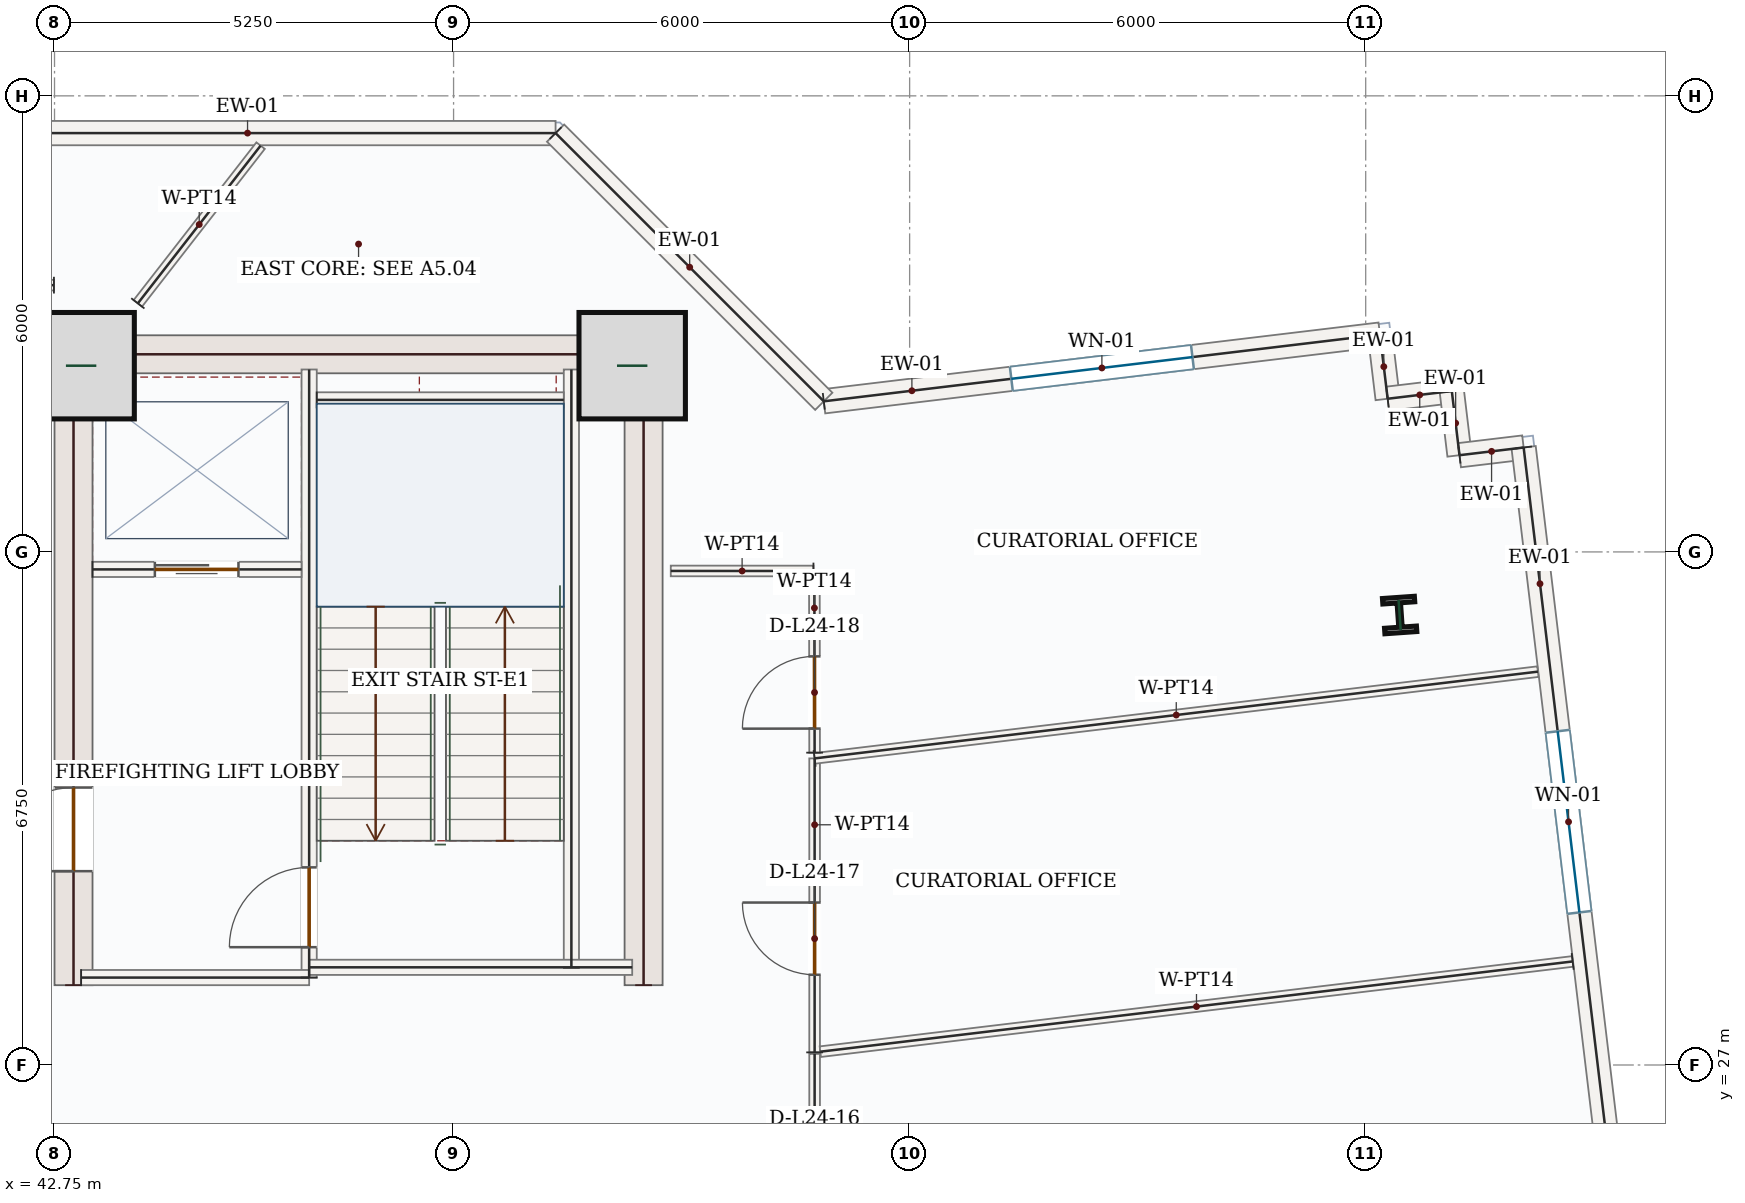
"""IFC4 building model, lengths in metres.
Left out: names, types, materials, properties, quantities, classifications, styles, units other than length and angle.
Written with IfcOpenShell. Run it as: python <this file> out.ifc"""

import sys

from ifc_helpers import new_model, si_unit, direction, frame, frame_2d, origin, origin_2d, place, context, subcontext, project, spatial, rectangle, i_section, extrude, source, transform, mapped, element, fill, save


model = new_model("IFC4")
c1 = context("Model", 3, precision=1e-05, world=origin(), true_north=direction((0.0, 1.0)))
c2 = subcontext(c1, "Body", "Model", "MODEL_VIEW")
j1 = project(units=[si_unit("LENGTHUNIT", "METRE"), si_unit("PLANEANGLEUNIT", "RADIAN")], contexts=[c1])
p1 = place(None, origin())
s1 = spatial("IfcSite", under=j1, at=p1, CompositionType="ELEMENT")
p2 = place(p1, origin())
s2 = spatial("IfcBuilding", under=s1, at=p2, CompositionType="ELEMENT")
p3 = place(p2, frame((0.0, 0.0, 108.9)))
s3 = spatial("IfcBuildingStorey", under=s2, at=p3, CompositionType="ELEMENT", Elevation=108.9)
p4 = place(p3, frame((43.0, 28.05, 0.0), z_axis=(0.0, 0.0, 1.0), x_axis=(0.0, 1.0, 0.0)))
e1 = element("IfcWall", 1, at=p4, inside=s3, PredefinedType="SHEAR", context=c2, shape_type="SweptSolid", body=[
    extrude(rectangle(XDim=8.55, YDim=0.5, at=frame_2d((4.275, 0.0))), origin(), (0.0, 0.0, 1.0), 3.95),
])
p5 = place(p4, frame((1.5, 0.0, 0.0)))
e2 = element("IfcOpeningElement", 2, at=p5, cuts=e1, PredefinedType="OPENING", context=c2, shape_type="SweptSolid", body=[
    extrude(rectangle(XDim=1.1, YDim=2.2, at=frame_2d((0.55, 1.1))), frame((0.0, 0.26, 0.0), z_axis=(0.0, -1.0, 0.0), x_axis=(1.0, 0.0, 0.0)), (0.0, 0.0, 1.0), 0.52),
])
m1 = source(origin(), c2, "Body", "SweptSolid", [
    extrude(rectangle(XDim=8.55, YDim=0.5, at=frame_2d((4.275, 0.0))), origin(), (0.0, 0.0, 1.0), 3.95),
])
p6 = place(p3, frame((50.5, 28.05, 0.0), z_axis=(0.0, 0.0, 1.0), x_axis=(0.0, 1.0, 0.0)))
e3 = element("IfcWall", 3, at=p6, inside=s3, PredefinedType="SHEAR", context=c2, shape_type="MappedRepresentation", body=[
    mapped(m1, transform((0.0, 0.0, 0.0), x_axis=(1.0, 0.0, 0.0), y_axis=(0.0, 1.0, 0.0), z_axis=(0.0, 0.0, 1.0), scale=1.0)),
])
m2 = source(origin(), c2, "Body", "SweptSolid", [
    extrude(rectangle(XDim=7.0, YDim=0.5, at=frame_2d((3.5, 0.0))), origin(), (0.0, 0.0, 1.0), 3.95),
])
p7 = place(p3, frame((43.25, 36.35, 0.0), z_axis=(0.0, 0.0, 1.0), x_axis=(1.0, 0.0, 0.0)))
e4 = element("IfcWall", 4, at=p7, inside=s3, PredefinedType="SHEAR", context=c2, shape_type="MappedRepresentation", body=[
    mapped(m2, transform((0.0, 0.0, 0.0), x_axis=(1.0, 0.0, 0.0), y_axis=(0.0, 1.0, 0.0), z_axis=(0.0, 0.0, 1.0), scale=1.0)),
])
m3 = source(origin(), c2, "Body", "SweptSolid", [
    extrude(rectangle(XDim=1.4, YDim=1.4, at=origin_2d()), origin(), (0.0, 0.0, 1.0), 4.2),
])
for number, where, z_axis, x_axis in (
    (5, (43.1, 36.2, 0.0), (0.0, 0.0, 1.0), (1.0, 0.0, 0.0)),
    (6, (50.35, 36.2, 0.0), (0.0, 0.0, 1.0), (1.0, 0.0, 0.0)),
):
    element("IfcColumn", number, at=place(p3, frame(where, z_axis=z_axis, x_axis=x_axis)), inside=s3, PredefinedType="COLUMN", context=c2, shape_type="MappedRepresentation", body=[
        mapped(m3, transform((0.0, 0.0, 0.0), x_axis=(1.0, 0.0, 0.0), y_axis=(0.0, 1.0, 0.0), z_axis=(0.0, 0.0, 1.0), scale=1.0)),
    ])
m4 = source(origin(), c2, "Body", "SweptSolid", [
    extrude(i_section(OverallWidth=0.421, OverallDepth=0.465, WebThickness=0.045, FlangeThickness=0.073, FilletRadius=0.018, at=origin_2d()), origin(), (0.0, 0.0, 1.0), 4.2),
])
p8 = place(p3, frame((60.447, 32.92, 0.0), z_axis=(0.0, 0.0, 1.0), x_axis=(0.99756405026, 0.069756473744, 0.0)))
e7 = element("IfcColumn", 7, at=p8, inside=s3, PredefinedType="COLUMN", context=c2, shape_type="MappedRepresentation", body=[
    mapped(m4, transform((0.0, 0.0, 0.0), x_axis=(1.0, 0.0, 0.0), y_axis=(0.0, 1.0, 0.0), z_axis=(0.0, 0.0, 1.0), scale=1.0)),
])
p9 = place(p3, frame((52.871, 35.731, 0.0), z_axis=(0.0, 0.0, 1.0), x_axis=(0.992882794037, 0.119095580547, 0.0)))
e8 = element("IfcWall", 8, at=p9, inside=s3, PredefinedType="SOLIDWALL", context=c2, shape_type="SweptSolid", body=[
    extrude(rectangle(XDim=7.37, YDim=0.32, at=frame_2d((3.685, 0.0))), origin(), (0.0, 0.0, 1.0), 3.95),
])
p10 = place(p9, frame((2.485, 0.0, 0.85)))
e9 = element("IfcOpeningElement", 9, at=p10, cuts=e8, PredefinedType="OPENING", context=c2, shape_type="SweptSolid", body=[
    extrude(rectangle(XDim=2.4, YDim=1.8, at=frame_2d((1.2, 0.9))), frame((0.0, 0.17, 0.0), z_axis=(0.0, -1.0, 0.0), x_axis=(1.0, 0.0, 0.0)), (0.0, 0.0, 1.0), 0.34),
])
m5 = source(origin(), c2, "Body", "SweptSolid", [
    extrude(rectangle(XDim=0.85, YDim=0.32, at=frame_2d((0.425, 0.0))), origin(), (0.0, 0.0, 1.0), 3.95),
])
for number, where, z_axis, x_axis in (
    (10, (60.188, 36.609, 0.0), (0.0, 0.0, 1.0), (0.119, -0.993, 0.0)),
    (11, (60.289, 35.765, 0.0), (0.0, 0.0, 1.0), (0.993, 0.119, 0.0)),
):
    element("IfcWall", number, at=place(p3, frame(where, z_axis=z_axis, x_axis=x_axis)), inside=s3, PredefinedType="SOLIDWALL", context=c2, shape_type="MappedRepresentation", body=[
        mapped(m5, transform((0.0, 0.0, 0.0), x_axis=(1.0, 0.0, 0.0), y_axis=(0.0, 1.0, 0.0), z_axis=(0.0, 0.0, 1.0), scale=1.0)),
    ])
m6 = source(origin(), c2, "Body", "SweptSolid", [
    extrude(rectangle(XDim=0.85, YDim=0.32, at=frame_2d((0.425, 0.0))), origin(), (0.0, 0.0, 1.0), 3.95),
])
p11 = place(p3, frame((61.133, 35.866, 0.0), z_axis=(0.0, 0.0, 1.0), x_axis=(0.11894130009, -0.992901287708, 0.0)))
e12 = element("IfcWall", 12, at=p11, inside=s3, PredefinedType="SOLIDWALL", context=c2, shape_type="MappedRepresentation", body=[
    mapped(m6, transform((0.0, 0.0, 0.0), x_axis=(1.0, 0.0, 0.0), y_axis=(0.0, 1.0, 0.0), z_axis=(0.0, 0.0, 1.0), scale=1.0)),
])
p12 = place(p3, frame((61.234, 35.022, 0.0), z_axis=(0.0, 0.0, 1.0), x_axis=(0.992905350382, 0.118907380694, 0.0)))
e13 = element("IfcWall", 13, at=p12, inside=s3, PredefinedType="SOLIDWALL", context=c2, shape_type="MappedRepresentation", body=[
    mapped(m5, transform((0.0, 0.0, 0.0), x_axis=(1.0, 0.0, 0.0), y_axis=(0.0, 1.0, 0.0), z_axis=(0.0, 0.0, 1.0), scale=1.0)),
])
p13 = place(p3, frame((62.078, 35.124, 0.0), z_axis=(0.0, 0.0, 1.0), x_axis=(0.119092815244, -0.992883125729, 0.0)))
e14 = element("IfcWall", 14, at=p13, inside=s3, PredefinedType="SOLIDWALL", context=c2, shape_type="SweptSolid", body=[
    extrude(rectangle(XDim=9.92, YDim=0.32, at=frame_2d((4.96, 0.0))), origin(), (0.0, 0.0, 1.0), 3.95),
])
p14 = place(p13, frame((3.76, 0.0, 0.85)))
e15 = element("IfcOpeningElement", 15, at=p14, cuts=e14, PredefinedType="OPENING", context=c2, shape_type="SweptSolid", body=[
    extrude(rectangle(XDim=2.4, YDim=1.8, at=frame_2d((1.2, 0.9))), frame((0.0, 0.17, 0.0), z_axis=(0.0, -1.0, 0.0), x_axis=(1.0, 0.0, 0.0)), (0.0, 0.0, 1.0), 0.34),
])
m7 = source(origin(), c2, "Body", "SweptSolid", [
    extrude(rectangle(XDim=8.105, YDim=0.32, at=frame_2d((4.052, 0.0))), origin(), (0.0, 0.0, 1.0), 3.95),
])
p15 = place(p3, frame((41.237, 39.26, 0.0), z_axis=(0.0, 0.0, 1.0), x_axis=(1.0, 0.0, 0.0)))
e16 = element("IfcWall", 16, at=p15, inside=s3, PredefinedType="SOLIDWALL", context=c2, shape_type="MappedRepresentation", body=[
    mapped(m7, transform((0.0, 0.0, 0.0), x_axis=(1.0, 0.0, 0.0), y_axis=(0.0, 1.0, 0.0), z_axis=(0.0, 0.0, 1.0), scale=1.0)),
])
m8 = source(origin(), c2, "Body", "SweptSolid", [
    extrude(rectangle(XDim=4.99, YDim=0.32, at=frame_2d((2.495, 0.0))), origin(), (0.0, 0.0, 1.0), 3.95),
])
p16 = place(p3, frame((49.342, 39.26, 0.0), z_axis=(0.0, 0.0, 1.0), x_axis=(0.707106781187, -0.707106781187, 0.0)))
e17 = element("IfcWall", 17, at=p16, inside=s3, PredefinedType="SOLIDWALL", context=c2, shape_type="MappedRepresentation", body=[
    mapped(m8, transform((0.0, 0.0, 0.0), x_axis=(1.0, 0.0, 0.0), y_axis=(0.0, 1.0, 0.0), z_axis=(0.0, 0.0, 1.0), scale=1.0)),
])
m9 = source(origin(), c2, "Body", "SweptSolid", [
    extrude(rectangle(XDim=7.87, YDim=0.2, at=frame_2d((3.935, 0.0))), origin(), (0.0, 0.0, 1.0), 3.95),
])
p17 = place(p3, frame((49.55, 28.28, 0.0), z_axis=(0.0, 0.0, 1.0), x_axis=(0.0, 1.0, 0.0)))
e18 = element("IfcWall", 18, at=p17, inside=s3, PredefinedType="SOLIDWALL", context=c2, shape_type="MappedRepresentation", body=[
    mapped(m9, transform((0.0, 0.0, 0.0), x_axis=(1.0, 0.0, 0.0), y_axis=(0.0, 1.0, 0.0), z_axis=(0.0, 0.0, 1.0), scale=1.0)),
])
p18 = place(p3, frame((46.1, 28.15, 0.0), z_axis=(0.0, 0.0, 1.0), x_axis=(0.0, 1.0, 0.0)))
e19 = element("IfcWall", 19, at=p18, inside=s3, PredefinedType="SOLIDWALL", context=c2, shape_type="SweptSolid", body=[
    extrude(rectangle(XDim=8.0, YDim=0.2, at=frame_2d((4.0, 0.0))), origin(), (0.0, 0.0, 1.0), 3.95),
])
p19 = place(p18, frame((0.4, 0.0, 0.0)))
e20 = element("IfcOpeningElement", 20, at=p19, cuts=e19, PredefinedType="OPENING", context=c2, shape_type="SweptSolid", body=[
    extrude(rectangle(XDim=1.05, YDim=2.15, at=frame_2d((0.525, 1.075))), frame((0.0, 0.11, 0.0), z_axis=(0.0, -1.0, 0.0), x_axis=(1.0, 0.0, 0.0)), (0.0, 0.0, 1.0), 0.22),
])
m10 = source(origin(), c2, "Body", "SweptSolid", [
    extrude(rectangle(XDim=3.0, YDim=0.2, at=frame_2d((1.5, 0.0))), origin(), (0.0, 0.0, 1.0), 3.95),
])
p20 = place(p3, frame((43.1, 28.15, 0.0), z_axis=(0.0, 0.0, 1.0), x_axis=(1.0, 0.0, 0.0)))
e21 = element("IfcWall", 21, at=p20, inside=s3, PredefinedType="SOLIDWALL", context=c2, shape_type="MappedRepresentation", body=[
    mapped(m10, transform((0.0, 0.0, 0.0), x_axis=(1.0, 0.0, 0.0), y_axis=(0.0, 1.0, 0.0), z_axis=(0.0, 0.0, 1.0), scale=1.0)),
])
m11 = source(origin(), c2, "Body", "SweptSolid", [
    extrude(rectangle(XDim=4.25, YDim=0.2, at=frame_2d((2.125, 0.0))), origin(), (0.0, 0.0, 1.0), 3.95),
])
p21 = place(p3, frame((46.1, 28.285, 0.0), z_axis=(0.0, 0.0, 1.0), x_axis=(1.0, 0.0, 0.0)))
e22 = element("IfcWall", 22, at=p21, inside=s3, PredefinedType="SOLIDWALL", context=c2, shape_type="MappedRepresentation", body=[
    mapped(m11, transform((0.0, 0.0, 0.0), x_axis=(1.0, 0.0, 0.0), y_axis=(0.0, 1.0, 0.0), z_axis=(0.0, 0.0, 1.0), scale=1.0)),
])
m12 = source(origin(), c2, "Body", "SweptSolid", [
    extrude(rectangle(XDim=3.25, YDim=0.2, at=frame_2d((1.625, 0.0))), origin(), (0.0, 0.0, 1.0), 3.95),
])
p22 = place(p3, frame((46.2, 35.75, 0.0), z_axis=(0.0, 0.0, 1.0), x_axis=(1.0, 0.0, 0.0)))
e23 = element("IfcWall", 23, at=p22, inside=s3, PredefinedType="SOLIDWALL", context=c2, shape_type="MappedRepresentation", body=[
    mapped(m12, transform((0.0, 0.0, 0.0), x_axis=(1.0, 0.0, 0.0), y_axis=(0.0, 1.0, 0.0), z_axis=(0.0, 0.0, 1.0), scale=1.0)),
])
p23 = place(p3, frame((43.25, 33.52, 0.0), z_axis=(0.0, 0.0, 1.0), x_axis=(1.0, 0.0, 0.0)))
e24 = element("IfcWall", 24, at=p23, inside=s3, PredefinedType="SOLIDWALL", context=c2, shape_type="SweptSolid", body=[
    extrude(rectangle(XDim=2.75, YDim=0.2, at=frame_2d((1.375, 0.0))), origin(), (0.0, 0.0, 1.0), 3.95),
])
p24 = place(p23, frame((0.82, 0.0, 0.0)))
e25 = element("IfcOpeningElement", 25, at=p24, cuts=e24, PredefinedType="OPENING", context=c2, shape_type="SweptSolid", body=[
    extrude(rectangle(XDim=1.1, YDim=2.15, at=frame_2d((0.55, 1.075))), frame((0.0, 0.11, 0.0), z_axis=(0.0, -1.0, 0.0), x_axis=(1.0, 0.0, 0.0)), (0.0, 0.0, 1.0), 0.22),
])
p25 = place(p3, frame((52.75, 27.166, 0.0), z_axis=(0.0, 0.0, 1.0), x_axis=(0.0, 1.0, 0.0)))
e26 = element("IfcWall", 26, at=p25, inside=s3, PredefinedType="PARTITIONING", context=c2, shape_type="SweptSolid", body=[
    extrude(rectangle(XDim=3.868, YDim=0.14, at=frame_2d((1.934, 0.0))), origin(), (0.0, 0.0, 1.0), 3.95),
])
p26 = place(p25, frame((1.021, 0.0, 0.0)))
e27 = element("IfcOpeningElement", 27, at=p26, cuts=e26, PredefinedType="OPENING", context=c2, shape_type="SweptSolid", body=[
    extrude(rectangle(XDim=0.95, YDim=2.15, at=frame_2d((0.475, 1.075))), frame((0.0, 0.08, 0.0), z_axis=(0.0, -1.0, 0.0), x_axis=(1.0, 0.0, 0.0)), (0.0, 0.0, 1.0), 0.16),
])
m13 = source(origin(), c2, "Body", "SweptSolid", [
    extrude(rectangle(XDim=9.584, YDim=0.14, at=frame_2d((4.792, 0.0))), origin(), (0.0, 0.0, 1.0), 3.95),
])
p27 = place(p3, frame((52.75, 31.034, 0.0), z_axis=(0.0, 0.0, 1.0), x_axis=(0.992883225705, 0.119091981737, 0.0)))
e28 = element("IfcWall", 28, at=p27, inside=s3, PredefinedType="PARTITIONING", context=c2, shape_type="MappedRepresentation", body=[
    mapped(m13, transform((0.0, 0.0, 0.0), x_axis=(1.0, 0.0, 0.0), y_axis=(0.0, 1.0, 0.0), z_axis=(0.0, 0.0, 1.0), scale=1.0)),
])
m14 = source(origin(), c2, "Body", "SweptSolid", [
    extrude(rectangle(XDim=9.969, YDim=0.14, at=frame_2d((4.984, 0.0))), origin(), (0.0, 0.0, 1.0), 3.95),
])
p28 = place(p3, frame((62.723, 28.362, 0.0), z_axis=(0.0, 0.0, 1.0), x_axis=(-0.992882747367, -0.119095969623, 0.0)))
e29 = element("IfcWall", 29, at=p28, inside=s3, PredefinedType="PARTITIONING", context=c2, shape_type="MappedRepresentation", body=[
    mapped(m14, transform((0.0, 0.0, 0.0), x_axis=(1.0, 0.0, 0.0), y_axis=(0.0, 1.0, 0.0), z_axis=(0.0, 0.0, 1.0), scale=1.0)),
])
p29 = place(p3, frame((52.75, 20.575, 0.0), z_axis=(0.0, 0.0, 1.0), x_axis=(0.0, 1.0, 0.0)))
e30 = element("IfcWall", 30, at=p29, inside=s3, PredefinedType="PARTITIONING", context=c2, shape_type="SweptSolid", body=[
    extrude(rectangle(XDim=6.571, YDim=0.14, at=frame_2d((3.285, 0.0))), origin(), (0.0, 0.0, 1.0), 3.95),
])
p30 = place(p29, frame((4.384, 0.0, 0.0)))
e31 = element("IfcOpeningElement", 31, at=p30, cuts=e30, PredefinedType="OPENING", context=c2, shape_type="SweptSolid", body=[
    extrude(rectangle(XDim=0.95, YDim=2.15, at=frame_2d((0.475, 1.075))), frame((0.0, 0.08, 0.0), z_axis=(0.0, -1.0, 0.0), x_axis=(1.0, 0.0, 0.0)), (0.0, 0.0, 1.0), 0.16),
])
m15 = source(origin(), c2, "Body", "SweptSolid", [
    extrude(rectangle(XDim=2.629, YDim=0.14, at=frame_2d((1.315, 0.0))), origin(), (0.0, 0.0, 1.0), 3.95),
])
p31 = place(p3, frame((43.846, 37.02, 0.0), z_axis=(0.0, 0.0, 1.0), x_axis=(0.614210560268, 0.789142184689, 0.0)))
e32 = element("IfcWall", 32, at=p31, inside=s3, PredefinedType="PARTITIONING", context=c2, shape_type="MappedRepresentation", body=[
    mapped(m15, transform((0.0, 0.0, 0.0), x_axis=(1.0, 0.0, 0.0), y_axis=(0.0, 1.0, 0.0), z_axis=(0.0, 0.0, 1.0), scale=1.0)),
])
p32 = place(p3, frame((52.75, 31.109, 0.0), z_axis=(0.0, 0.0, 1.0), x_axis=(-0.001430175266, 0.999998977299, 0.0)))
e33 = element("IfcWall", 33, at=p32, inside=s3, PredefinedType="PARTITIONING", context=c2, shape_type="SweptSolid", body=[
    extrude(rectangle(XDim=2.39, YDim=0.14, at=frame_2d((1.195, 0.0))), origin(), (0.0, 0.0, 1.0), 3.95),
])
p33 = place(p32, frame((0.317, 0.0, 0.0)))
e34 = element("IfcOpeningElement", 34, at=p33, cuts=e33, PredefinedType="OPENING", context=c2, shape_type="SweptSolid", body=[
    extrude(rectangle(XDim=0.95, YDim=2.15, at=frame_2d((0.475, 1.075))), frame((0.0, 0.08, 0.0), z_axis=(0.0, -1.0, 0.0), x_axis=(1.0, 0.0, 0.0)), (0.0, 0.0, 1.0), 0.16),
])
m16 = source(origin(), c2, "Body", "SweptSolid", [
    extrude(rectangle(XDim=1.877, YDim=0.14, at=frame_2d((0.938, 0.0))), origin(), (0.0, 0.0, 1.0), 3.95),
])
p34 = place(p3, frame((52.735, 33.499, 0.0), z_axis=(0.0, 0.0, 1.0), x_axis=(-0.999999923865, 0.000390218493, 0.0)))
e35 = element("IfcWall", 35, at=p34, inside=s3, PredefinedType="PARTITIONING", context=c2, shape_type="MappedRepresentation", body=[
    mapped(m16, transform((0.0, 0.0, 0.0), x_axis=(1.0, 0.0, 0.0), y_axis=(0.0, 1.0, 0.0), z_axis=(0.0, 0.0, 1.0), scale=1.0)),
])
p35 = place(p3, frame((42.742, 37.26, 0.0), z_axis=(0.0, 0.0, 1.0), x_axis=(-0.999999999614, 2.7778549e-05, 0.0)))
e36 = element("IfcWall", 36, at=p35, inside=s3, PredefinedType="PARTITIONING", context=c2, shape_type="SweptSolid", body=[
    extrude(rectangle(XDim=8.789, YDim=0.14, at=frame_2d((4.395, 0.0))), origin(), (0.0, 0.0, 1.0), 3.95),
])
p36 = place(p35, frame((6.114, 0.0, 0.0)))
e37 = element("IfcOpeningElement", 37, at=p36, cuts=e36, PredefinedType="OPENING", context=c2, shape_type="SweptSolid", body=[
    extrude(rectangle(XDim=0.95, YDim=2.15, at=frame_2d((0.475, 1.075))), frame((0.0, 0.08, 0.0), z_axis=(0.0, -1.0, 0.0), x_axis=(1.0, 0.0, 0.0)), (0.0, 0.0, 1.0), 0.16),
])
m17 = source(origin(), c2, "Body", "SweptSolid", [
    extrude(rectangle(XDim=2.4, YDim=1.8, at=frame_2d((1.2, 0.9))), frame((0.0, 0.03, 0.0), z_axis=(0.0, -1.0, 0.0), x_axis=(1.0, 0.0, 0.0)), (0.0, 0.0, 1.0), 0.06),
])
p37 = place(p10, origin())
e38 = element("IfcWindow", 38, at=p37, inside=s3, PartitioningType="DOUBLE_PANEL_VERTICAL", PredefinedType="WINDOW", context=c2, shape_type="MappedRepresentation", body=[
    mapped(m17, transform((0.0, 0.0, 0.0), x_axis=(1.0, 0.0, 0.0), y_axis=(0.0, 1.0, 0.0), z_axis=(0.0, 0.0, 1.0), scale=1.0)),
])
fill(e9, e38)
p38 = place(p14, origin())
e39 = element("IfcWindow", 39, at=p38, inside=s3, PartitioningType="DOUBLE_PANEL_VERTICAL", PredefinedType="WINDOW", context=c2, shape_type="MappedRepresentation", body=[
    mapped(m17, transform((0.0, 0.0, 0.0), x_axis=(1.0, 0.0, 0.0), y_axis=(0.0, 1.0, 0.0), z_axis=(0.0, 0.0, 1.0), scale=1.0)),
])
fill(e15, e39)
m18 = source(origin(), c2, "Body", "SweptSolid", [
    extrude(rectangle(XDim=1.05, YDim=2.15, at=frame_2d((0.525, 1.075))), frame((0.0, 0.025, 0.0), z_axis=(0.0, -1.0, 0.0), x_axis=(1.0, 0.0, 0.0)), (0.0, 0.0, 1.0), 0.05),
])
p39 = place(p19, origin())
e40 = element("IfcDoor", 40, at=p39, inside=s3, OperationType="SINGLE_SWING_LEFT", PredefinedType="DOOR", context=c2, shape_type="MappedRepresentation", body=[
    mapped(m18, transform((0.0, 0.0, 0.0), x_axis=(1.0, 0.0, 0.0), y_axis=(0.0, 1.0, 0.0), z_axis=(0.0, 0.0, 1.0), scale=1.0)),
])
fill(e20, e40)
m19 = source(origin(), c2, "Body", "SweptSolid", [
    extrude(rectangle(XDim=1.1, YDim=2.15, at=frame_2d((0.55, 1.075))), frame((0.0, 0.025, 0.0), z_axis=(0.0, -1.0, 0.0), x_axis=(1.0, 0.0, 0.0)), (0.0, 0.0, 1.0), 0.05),
])
p40 = place(p24, origin())
e41 = element("IfcDoor", 41, at=p40, inside=s3, OperationType="DOUBLE_DOOR_SLIDING", PredefinedType="DOOR", context=c2, shape_type="MappedRepresentation", body=[
    mapped(m19, transform((0.0, 0.0, 0.0), x_axis=(1.0, 0.0, 0.0), y_axis=(0.0, 1.0, 0.0), z_axis=(0.0, 0.0, 1.0), scale=1.0)),
])
fill(e25, e41)
m20 = source(origin(), c2, "Body", "SweptSolid", [
    extrude(rectangle(XDim=1.1, YDim=2.2, at=frame_2d((0.55, 1.1))), frame((0.0, 0.025, 0.0), z_axis=(0.0, -1.0, 0.0), x_axis=(1.0, 0.0, 0.0)), (0.0, 0.0, 1.0), 0.05),
])
p41 = place(p5, origin())
e42 = element("IfcDoor", 42, at=p41, inside=s3, OperationType="SINGLE_SWING_LEFT", PredefinedType="DOOR", context=c2, shape_type="MappedRepresentation", body=[
    mapped(m20, transform((0.0, 0.0, 0.0), x_axis=(1.0, 0.0, 0.0), y_axis=(0.0, 1.0, 0.0), z_axis=(0.0, 0.0, 1.0), scale=1.0)),
])
fill(e2, e42)
m21 = source(origin(), c2, "Body", "SweptSolid", [
    extrude(rectangle(XDim=0.95, YDim=2.15, at=frame_2d((0.475, 1.075))), frame((0.0, 0.025, 0.0), z_axis=(0.0, -1.0, 0.0), x_axis=(1.0, 0.0, 0.0)), (0.0, 0.0, 1.0), 0.05),
])
p42 = place(p26, origin())
e43 = element("IfcDoor", 43, at=p42, inside=s3, OperationType="SINGLE_SWING_RIGHT", PredefinedType="DOOR", context=c2, shape_type="MappedRepresentation", body=[
    mapped(m21, transform((0.0, 0.0, 0.0), x_axis=(1.0, 0.0, 0.0), y_axis=(0.0, 1.0, 0.0), z_axis=(0.0, 0.0, 1.0), scale=1.0)),
])
fill(e27, e43)
p43 = place(p33, origin())
e44 = element("IfcDoor", 44, at=p43, inside=s3, OperationType="SINGLE_SWING_LEFT", PredefinedType="DOOR", context=c2, shape_type="MappedRepresentation", body=[
    mapped(m21, transform((0.0, 0.0, 0.0), x_axis=(1.0, 0.0, 0.0), y_axis=(0.0, 1.0, 0.0), z_axis=(0.0, 0.0, 1.0), scale=1.0)),
])
fill(e34, e44)
save(model, sys.argv[1])
